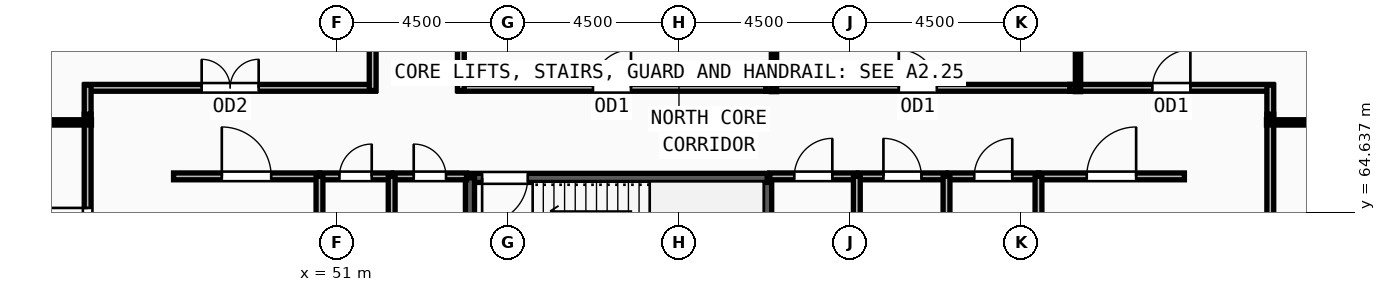
"""IFC4 building model, lengths in metres.
Left out: names, types, materials, properties, quantities, classifications, styles, units other than length and angle.
Written with IfcOpenShell. Run it as: python <this file> out.ifc"""

import sys

from ifc_helpers import new_model, si_unit, direction, frame, frame_2d, origin, place, context, subcontext, project, spatial, rectangle, extrude, source, transform, mapped, element, fill, save


model = new_model("IFC4")
c1 = context("Model", 3, precision=1e-05, world=origin(), true_north=direction((0.0, 1.0)))
c2 = subcontext(c1, "Body", "Model", "MODEL_VIEW")
j1 = project(units=[si_unit("LENGTHUNIT", "METRE"), si_unit("PLANEANGLEUNIT", "RADIAN")], contexts=[c1])
p1 = place(None, origin())
s1 = spatial("IfcSite", under=j1, at=p1, CompositionType="ELEMENT")
p2 = place(p1, origin())
s2 = spatial("IfcBuilding", under=s1, at=p2, CompositionType="ELEMENT")
p3 = place(p2, frame((0.0, 0.0, 328.5)))
s3 = spatial("IfcBuildingStorey", under=s2, at=p3, CompositionType="ELEMENT", Elevation=328.5)
p4 = place(p3, frame((62.32, 62.1, 0.0), z_axis=(0.0, 0.0, 1.0), x_axis=(0.0, 1.0, 0.0)))
e1 = element("IfcWall", 1, at=p4, inside=s3, PredefinedType="SOLIDWALL", context=c2, shape_type="SweptSolid", body=[
    extrude(rectangle(XDim=3.44, YDim=0.24, at=frame_2d((1.72, 0.0))), origin(), (0.0, 0.0, 1.0), 3.57),
])
p5 = place(p3, frame((62.32, 65.54, 0.0), z_axis=(0.0, 0.0, 1.0), x_axis=(-1.0, 0.0, 0.0)))
e2 = element("IfcWall", 2, at=p5, inside=s3, PredefinedType="SOLIDWALL", context=c2, shape_type="SweptSolid", body=[
    extrude(rectangle(XDim=7.82, YDim=0.24, at=frame_2d((3.91, 0.0))), origin(), (0.0, 0.0, 1.0), 3.57),
])
m1 = source(origin(), c2, "Body", "SweptSolid", [
    extrude(rectangle(XDim=1.2, YDim=2.2, at=frame_2d((0.6, 1.1))), frame((0.0, 0.13, 0.0), z_axis=(0.0, -1.0, 0.0), x_axis=(1.0, 0.0, 0.0)), (0.0, 0.0, 1.0), 0.26),
])
p6 = place(p5, frame((6.3, 0.0, 0.0)))
e3 = element("IfcOpeningElement", 3, at=p6, cuts=e2, PredefinedType="OPENING", context=c2, shape_type="MappedRepresentation", body=[
    mapped(m1, transform((0.0, 0.0, 0.0), x_axis=(1.0, 0.0, 0.0), y_axis=(0.0, 1.0, 0.0), z_axis=(0.0, 0.0, 1.0), scale=1.0)),
])
p7 = place(p3, frame((54.5, 65.54, 0.0), z_axis=(0.0, 0.0, 1.0), x_axis=(0.0, -1.0, 0.0)))
e4 = element("IfcWall", 4, at=p7, inside=s3, PredefinedType="SOLIDWALL", context=c2, shape_type="SweptSolid", body=[
    extrude(rectangle(XDim=3.44, YDim=0.24, at=frame_2d((1.72, 0.0))), origin(), (0.0, 0.0, 1.0), 3.57),
])
p8 = place(p3, frame((50.54, 65.58, 0.0), z_axis=(0.0, 0.0, 1.0), x_axis=(1.0, 0.0, 0.0)))
e5 = element("IfcWall", 5, at=p8, inside=s3, PredefinedType="PARTITIONING", context=c2, shape_type="SweptSolid", body=[
    extrude(rectangle(XDim=1.9, YDim=0.18, at=frame_2d((0.95, 0.0))), origin(), (0.0, 0.0, 1.0), 3.57),
])
m2 = source(origin(), c2, "Body", "SweptSolid", [
    extrude(rectangle(XDim=0.85, YDim=2.1, at=frame_2d((0.425, 1.05))), frame((0.0, 0.1, 0.0), z_axis=(0.0, -1.0, 0.0), x_axis=(1.0, 0.0, 0.0)), (0.0, 0.0, 1.0), 0.2),
])
p9 = place(p8, frame((0.525, 0.0, 0.0)))
e6 = element("IfcOpeningElement", 6, at=p9, cuts=e5, PredefinedType="OPENING", context=c2, shape_type="MappedRepresentation", body=[
    mapped(m2, transform((0.0, 0.0, 0.0), x_axis=(1.0, 0.0, 0.0), y_axis=(0.0, 1.0, 0.0), z_axis=(0.0, 0.0, 1.0), scale=1.0)),
])
p10 = place(p3, frame((52.48, 65.58, 0.0), z_axis=(0.0, 0.0, 1.0), x_axis=(1.0, 0.0, 0.0)))
e7 = element("IfcWall", 7, at=p10, inside=s3, PredefinedType="PARTITIONING", context=c2, shape_type="SweptSolid", body=[
    extrude(rectangle(XDim=1.93, YDim=0.18, at=frame_2d((0.965, 0.0))), origin(), (0.0, 0.0, 1.0), 3.57),
])
p11 = place(p10, frame((0.54, 0.0, 0.0)))
e8 = element("IfcOpeningElement", 8, at=p11, cuts=e7, PredefinedType="OPENING", context=c2, shape_type="MappedRepresentation", body=[
    mapped(m2, transform((0.0, 0.0, 0.0), x_axis=(1.0, 0.0, 0.0), y_axis=(0.0, 1.0, 0.0), z_axis=(0.0, 0.0, 1.0), scale=1.0)),
])
p12 = place(p3, frame((62.39, 65.58, 0.0), z_axis=(0.0, 0.0, 1.0), x_axis=(1.0, 0.0, 0.0)))
e9 = element("IfcWall", 9, at=p12, inside=s3, PredefinedType="PARTITIONING", context=c2, shape_type="SweptSolid", body=[
    extrude(rectangle(XDim=2.29, YDim=0.18, at=frame_2d((1.145, 0.0))), origin(), (0.0, 0.0, 1.0), 3.57),
])
m3 = source(origin(), c2, "Body", "SweptSolid", [
    extrude(rectangle(XDim=1.0, YDim=2.2, at=frame_2d((0.5, 1.1))), frame((0.0, 0.1, 0.0), z_axis=(0.0, -1.0, 0.0), x_axis=(1.0, 0.0, 0.0)), (0.0, 0.0, 1.0), 0.2),
])
p13 = place(p12, frame((0.645, 0.0, 0.0)))
e10 = element("IfcOpeningElement", 10, at=p13, cuts=e9, PredefinedType="OPENING", context=c2, shape_type="MappedRepresentation", body=[
    mapped(m3, transform((0.0, 0.0, 0.0), x_axis=(1.0, 0.0, 0.0), y_axis=(0.0, 1.0, 0.0), z_axis=(0.0, 0.0, 1.0), scale=1.0)),
])
p14 = place(p3, frame((64.72, 65.58, 0.0), z_axis=(0.0, 0.0, 1.0), x_axis=(1.0, 0.0, 0.0)))
e11 = element("IfcWall", 11, at=p14, inside=s3, PredefinedType="PARTITIONING", context=c2, shape_type="SweptSolid", body=[
    extrude(rectangle(XDim=2.32, YDim=0.18, at=frame_2d((1.16, 0.0))), origin(), (0.0, 0.0, 1.0), 3.57),
])
p15 = place(p14, frame((0.66, 0.0, 0.0)))
e12 = element("IfcOpeningElement", 12, at=p15, cuts=e11, PredefinedType="OPENING", context=c2, shape_type="MappedRepresentation", body=[
    mapped(m3, transform((0.0, 0.0, 0.0), x_axis=(1.0, 0.0, 0.0), y_axis=(0.0, 1.0, 0.0), z_axis=(0.0, 0.0, 1.0), scale=1.0)),
])
p16 = place(p3, frame((67.08, 65.58, 0.0), z_axis=(0.0, 0.0, 1.0), x_axis=(1.0, 0.0, 0.0)))
e13 = element("IfcWall", 13, at=p16, inside=s3, PredefinedType="PARTITIONING", context=c2, shape_type="SweptSolid", body=[
    extrude(rectangle(XDim=2.38, YDim=0.18, at=frame_2d((1.19, 0.0))), origin(), (0.0, 0.0, 1.0), 3.57),
])
p17 = place(p16, frame((0.69, 0.0, 0.0)))
e14 = element("IfcOpeningElement", 14, at=p17, cuts=e13, PredefinedType="OPENING", context=c2, shape_type="MappedRepresentation", body=[
    mapped(m3, transform((0.0, 0.0, 0.0), x_axis=(1.0, 0.0, 0.0), y_axis=(0.0, 1.0, 0.0), z_axis=(0.0, 0.0, 1.0), scale=1.0)),
])
p18 = place(p3, frame((46.7, 65.58, 0.0), z_axis=(0.0, 0.0, 1.0), x_axis=(1.0, 0.0, 0.0)))
e15 = element("IfcWall", 15, at=p18, inside=s3, PredefinedType="PARTITIONING", context=c2, shape_type="SweptSolid", body=[
    extrude(rectangle(XDim=3.84, YDim=0.18, at=frame_2d((1.92, 0.0))), origin(), (0.0, 0.0, 1.0), 3.57),
])
m4 = source(origin(), c2, "Body", "SweptSolid", [
    extrude(rectangle(XDim=1.3, YDim=2.2, at=frame_2d((0.65, 1.1))), frame((0.0, 0.1, 0.0), z_axis=(0.0, -1.0, 0.0), x_axis=(1.0, 0.0, 0.0)), (0.0, 0.0, 1.0), 0.2),
])
p19 = place(p18, frame((1.27, 0.0, 0.0)))
e16 = element("IfcOpeningElement", 16, at=p19, cuts=e15, PredefinedType="OPENING", context=c2, shape_type="MappedRepresentation", body=[
    mapped(m4, transform((0.0, 0.0, 0.0), x_axis=(1.0, 0.0, 0.0), y_axis=(0.0, 1.0, 0.0), z_axis=(0.0, 0.0, 1.0), scale=1.0)),
])
p20 = place(p3, frame((69.46, 65.58, 0.0), z_axis=(0.0, 0.0, 1.0), x_axis=(1.0, 0.0, 0.0)))
e17 = element("IfcWall", 17, at=p20, inside=s3, PredefinedType="PARTITIONING", context=c2, shape_type="SweptSolid", body=[
    extrude(rectangle(XDim=3.84, YDim=0.18, at=frame_2d((1.92, 0.0))), origin(), (0.0, 0.0, 1.0), 3.57),
])
p21 = place(p20, frame((1.27, 0.0, 0.0)))
e18 = element("IfcOpeningElement", 18, at=p21, cuts=e17, PredefinedType="OPENING", context=c2, shape_type="MappedRepresentation", body=[
    mapped(m4, transform((0.0, 0.0, 0.0), x_axis=(1.0, 0.0, 0.0), y_axis=(0.0, 1.0, 0.0), z_axis=(0.0, 0.0, 1.0), scale=1.0)),
])
p22 = place(p3, frame((75.56, 67.215, 0.0), z_axis=(0.0, 0.0, 1.0), x_axis=(0.0, -1.0, 0.0)))
e19 = element("IfcWall", 19, at=p22, inside=s3, PredefinedType="PARTITIONING", context=c2, shape_type="SweptSolid", body=[
    extrude(rectangle(XDim=16.825, YDim=0.18, at=frame_2d((8.413, 0.0))), origin(), (0.0, 0.0, 1.0), 3.57),
])
m5 = source(origin(), c2, "Body", "SweptSolid", [
    extrude(rectangle(XDim=1.5, YDim=2.2, at=frame_2d((0.75, 1.1))), frame((0.0, 0.1, 0.0), z_axis=(0.0, -1.0, 0.0), x_axis=(1.0, 0.0, 0.0)), (0.0, 0.0, 1.0), 0.2),
])
p23 = place(p22, frame((7.663, 0.0, 0.0)))
e20 = element("IfcOpeningElement", 20, at=p23, cuts=e19, PredefinedType="OPENING", context=c2, shape_type="MappedRepresentation", body=[
    mapped(m5, transform((0.0, 0.0, 0.0), x_axis=(1.0, 0.0, 0.0), y_axis=(0.0, 1.0, 0.0), z_axis=(0.0, 0.0, 1.0), scale=1.0)),
])
p24 = place(p3, frame((70.285, 67.91, 0.0), z_axis=(0.0, 0.0, 1.0), x_axis=(1.0, 0.0, 0.0)))
e21 = element("IfcWall", 21, at=p24, inside=s3, PredefinedType="PARTITIONING", context=c2, shape_type="SweptSolid", body=[
    extrude(rectangle(XDim=5.345, YDim=0.18, at=frame_2d((2.672, 0.0))), origin(), (0.0, 0.0, 1.0), 3.57),
])
p25 = place(p24, frame((2.172, 0.0, 0.0)))
e22 = element("IfcOpeningElement", 22, at=p25, cuts=e21, PredefinedType="OPENING", context=c2, shape_type="MappedRepresentation", body=[
    mapped(m3, transform((0.0, 0.0, 0.0), x_axis=(1.0, 0.0, 0.0), y_axis=(0.0, 1.0, 0.0), z_axis=(0.0, 0.0, 1.0), scale=1.0)),
])
p26 = place(p3, frame((62.285, 67.91, 0.0), z_axis=(0.0, 0.0, 1.0), x_axis=(1.0, 0.0, 0.0)))
e23 = element("IfcWall", 23, at=p26, inside=s3, PredefinedType="PARTITIONING", context=c2, shape_type="SweptSolid", body=[
    extrude(rectangle(XDim=8.0, YDim=0.18, at=frame_2d((4.0, 0.0))), origin(), (0.0, 0.0, 1.0), 3.57),
])
p27 = place(p26, frame((3.5, 0.0, 0.0)))
e24 = element("IfcOpeningElement", 24, at=p27, cuts=e23, PredefinedType="OPENING", context=c2, shape_type="MappedRepresentation", body=[
    mapped(m3, transform((0.0, 0.0, 0.0), x_axis=(1.0, 0.0, 0.0), y_axis=(0.0, 1.0, 0.0), z_axis=(0.0, 0.0, 1.0), scale=1.0)),
])
p28 = place(p3, frame((54.19, 67.91, 0.0), z_axis=(0.0, 0.0, 1.0), x_axis=(1.0, 0.0, 0.0)))
e25 = element("IfcWall", 25, at=p28, inside=s3, PredefinedType="PARTITIONING", context=c2, shape_type="SweptSolid", body=[
    extrude(rectangle(XDim=8.095, YDim=0.18, at=frame_2d((4.047, 0.0))), origin(), (0.0, 0.0, 1.0), 3.57),
])
p29 = place(p28, frame((3.547, 0.0, 0.0)))
e26 = element("IfcOpeningElement", 26, at=p29, cuts=e25, PredefinedType="OPENING", context=c2, shape_type="MappedRepresentation", body=[
    mapped(m3, transform((0.0, 0.0, 0.0), x_axis=(1.0, 0.0, 0.0), y_axis=(0.0, 1.0, 0.0), z_axis=(0.0, 0.0, 1.0), scale=1.0)),
])
p30 = place(p3, frame((44.37, 67.91, 0.0), z_axis=(0.0, 0.0, 1.0), x_axis=(1.0, 0.0, 0.0)))
e27 = element("IfcWall", 27, at=p30, inside=s3, PredefinedType="PARTITIONING", context=c2, shape_type="SweptSolid", body=[
    extrude(rectangle(XDim=7.64, YDim=0.18, at=frame_2d((3.82, 0.0))), origin(), (0.0, 0.0, 1.0), 3.57),
])
p31 = place(p30, frame((3.07, 0.0, 0.0)))
e28 = element("IfcOpeningElement", 28, at=p31, cuts=e27, PredefinedType="OPENING", context=c2, shape_type="MappedRepresentation", body=[
    mapped(m5, transform((0.0, 0.0, 0.0), x_axis=(1.0, 0.0, 0.0), y_axis=(0.0, 1.0, 0.0), z_axis=(0.0, 0.0, 1.0), scale=1.0)),
])
p32 = place(p3, frame((44.44, 61.285, 0.0), z_axis=(0.0, 0.0, 1.0), x_axis=(0.0, 1.0, 0.0)))
e29 = element("IfcWall", 29, at=p32, inside=s3, PredefinedType="PARTITIONING", context=c2, shape_type="SweptSolid", body=[
    extrude(rectangle(XDim=5.93, YDim=0.18, at=frame_2d((2.965, 0.0))), origin(), (0.0, 0.0, 1.0), 3.57),
])
p33 = place(p32, frame((2.465, 0.0, 0.0)))
e30 = element("IfcOpeningElement", 30, at=p33, cuts=e29, PredefinedType="OPENING", context=c2, shape_type="MappedRepresentation", body=[
    mapped(m3, transform((0.0, 0.0, 0.0), x_axis=(1.0, 0.0, 0.0), y_axis=(0.0, 1.0, 0.0), z_axis=(0.0, 0.0, 1.0), scale=1.0)),
])
p34 = place(p3, frame((50.54, 61.95, 0.0), z_axis=(0.0, 0.0, 1.0), x_axis=(0.0, 1.0, 0.0)))
e31 = element("IfcWall", 31, at=p34, inside=s3, PredefinedType="PARTITIONING", context=c2, shape_type="SweptSolid", body=[
    extrude(rectangle(XDim=3.63, YDim=0.18, at=frame_2d((1.815, 0.0))), origin(), (0.0, 0.0, 1.0), 3.57),
])
for number, where, z_axis, x_axis in (
    (32, (52.44, 61.775, 0.0), (0.0, 0.0, 1.0), (0.0, 1.0, 0.0)),
    (33, (64.68, 61.775, 0.0), (0.0, 0.0, 1.0), (0.0, 1.0, 0.0)),
    (34, (67.04, 61.775, 0.0), (0.0, 0.0, 1.0), (0.0, 1.0, 0.0)),
):
    element("IfcWall", number, at=place(p3, frame(where, z_axis=z_axis, x_axis=x_axis)), inside=s3, PredefinedType="PARTITIONING", context=c2, shape_type="SweptSolid", body=[
        extrude(rectangle(XDim=3.805, YDim=0.18, at=frame_2d((1.903, 0.0))), origin(), (0.0, 0.0, 1.0), 3.57),
    ])
p35 = place(p3, frame((69.46, 61.95, 0.0), z_axis=(0.0, 0.0, 1.0), x_axis=(0.0, 1.0, 0.0)))
e35 = element("IfcWall", 35, at=p35, inside=s3, PredefinedType="PARTITIONING", context=c2, shape_type="SweptSolid", body=[
    extrude(rectangle(XDim=3.63, YDim=0.18, at=frame_2d((1.815, 0.0))), origin(), (0.0, 0.0, 1.0), 3.57),
])
p36 = place(p3, frame((75.56, 67.98, 0.0), z_axis=(0.0, 0.0, 1.0), x_axis=(0.0, -1.0, 0.0)))
e36 = element("IfcWall", 36, at=p36, inside=s3, PredefinedType="PARTITIONING", context=c2, shape_type="SweptSolid", body=[
    extrude(rectangle(XDim=0.765, YDim=0.18, at=frame_2d((0.382, 0.0))), origin(), (0.0, 0.0, 1.0), 3.57),
])
p37 = place(p3, frame((54.26, 75.476, 0.0), z_axis=(0.0, 0.0, 1.0), x_axis=(0.0, -1.0, 0.0)))
e37 = element("IfcWall", 37, at=p37, inside=s3, PredefinedType="PARTITIONING", context=c2, shape_type="SweptSolid", body=[
    extrude(rectangle(XDim=7.636, YDim=0.18, at=frame_2d((3.818, 0.0))), origin(), (0.0, 0.0, 1.0), 3.57),
])
p38 = place(p3, frame((51.94, 67.84, 0.0), z_axis=(0.0, 0.0, 1.0), x_axis=(0.0, 1.0, 0.0)))
e38 = element("IfcWall", 38, at=p38, inside=s3, PredefinedType="PARTITIONING", context=c2, shape_type="SweptSolid", body=[
    extrude(rectangle(XDim=7.477, YDim=0.18, at=frame_2d((3.738, 0.0))), origin(), (0.0, 0.0, 1.0), 3.57),
])
p39 = place(p3, frame((44.44, 67.215, 0.0), z_axis=(0.0, 0.0, 1.0), x_axis=(0.0, 1.0, 0.0)))
e39 = element("IfcWall", 39, at=p39, inside=s3, PredefinedType="PARTITIONING", context=c2, shape_type="SweptSolid", body=[
    extrude(rectangle(XDim=0.765, YDim=0.18, at=frame_2d((0.382, 0.0))), origin(), (0.0, 0.0, 1.0), 3.57),
])
for number, where, z_axis, x_axis in (
    (40, (44.54, 67.0, 0.0), (0.0, 0.0, 1.0), (-1.0, 0.0, 0.0)),
    (41, (75.46, 67.0, 0.0), (0.0, 0.0, 1.0), (1.0, 0.0, 0.0)),
):
    element("IfcWall", number, at=place(p3, frame(where, z_axis=z_axis, x_axis=x_axis)), inside=s3, PredefinedType="PARTITIONING", context=c2, shape_type="SweptSolid", body=[
        extrude(rectangle(XDim=13.154, YDim=0.14, at=frame_2d((6.577, 0.0))), origin(), (0.0, 0.0, 1.0), 3.57),
    ])
p40 = place(p3, frame((62.5, 67.81, 0.0), z_axis=(0.0, 0.0, 1.0), x_axis=(0.0, 1.0, 0.0)))
e42 = element("IfcWall", 42, at=p40, inside=s3, PredefinedType="PARTITIONING", context=c2, shape_type="SweptSolid", body=[
    extrude(rectangle(XDim=8.287, YDim=0.14, at=frame_2d((4.144, 0.0))), origin(), (0.0, 0.0, 1.0), 3.57),
])
p41 = place(p3, frame((70.5, 67.81, 0.0), z_axis=(0.0, 0.0, 1.0), x_axis=(0.0, 1.0, 0.0)))
e43 = element("IfcWall", 43, at=p41, inside=s3, PredefinedType="PARTITIONING", context=c2, shape_type="SweptSolid", body=[
    extrude(rectangle(XDim=7.629, YDim=0.14, at=frame_2d((3.814, 0.0))), origin(), (0.0, 0.0, 1.0), 3.57),
])
m6 = source(origin(), c2, "Body", "SweptSolid", [
    extrude(rectangle(XDim=1.2, YDim=2.2, at=frame_2d((0.6, 1.1))), frame((0.0, 0.025, 0.0), z_axis=(0.0, -1.0, 0.0), x_axis=(1.0, 0.0, 0.0)), (0.0, 0.0, 1.0), 0.05),
])
p42 = place(p6, origin())
e44 = element("IfcDoor", 44, at=p42, inside=s3, OperationType="SINGLE_SWING_RIGHT", PredefinedType="DOOR", context=c2, shape_type="MappedRepresentation", body=[
    mapped(m6, transform((0.0, 0.0, 0.0), x_axis=(1.0, 0.0, 0.0), y_axis=(0.0, 1.0, 0.0), z_axis=(0.0, 0.0, 1.0), scale=1.0)),
])
fill(e3, e44)
m7 = source(origin(), c2, "Body", "SweptSolid", [
    extrude(rectangle(XDim=0.85, YDim=2.1, at=frame_2d((0.425, 1.05))), frame((0.0, 0.025, 0.0), z_axis=(0.0, -1.0, 0.0), x_axis=(1.0, 0.0, 0.0)), (0.0, 0.0, 1.0), 0.05),
])
p43 = place(p9, origin())
e45 = element("IfcDoor", 45, at=p43, inside=s3, OperationType="SINGLE_SWING_RIGHT", PredefinedType="DOOR", context=c2, shape_type="MappedRepresentation", body=[
    mapped(m7, transform((0.0, 0.0, 0.0), x_axis=(1.0, 0.0, 0.0), y_axis=(0.0, 1.0, 0.0), z_axis=(0.0, 0.0, 1.0), scale=1.0)),
])
fill(e6, e45)
p44 = place(p11, origin())
e46 = element("IfcDoor", 46, at=p44, inside=s3, OperationType="SINGLE_SWING_LEFT", PredefinedType="DOOR", context=c2, shape_type="MappedRepresentation", body=[
    mapped(m7, transform((0.0, 0.0, 0.0), x_axis=(1.0, 0.0, 0.0), y_axis=(0.0, 1.0, 0.0), z_axis=(0.0, 0.0, 1.0), scale=1.0)),
])
fill(e8, e46)
m8 = source(origin(), c2, "Body", "SweptSolid", [
    extrude(rectangle(XDim=1.0, YDim=2.2, at=frame_2d((0.5, 1.1))), frame((0.0, 0.025, 0.0), z_axis=(0.0, -1.0, 0.0), x_axis=(1.0, 0.0, 0.0)), (0.0, 0.0, 1.0), 0.05),
])
p45 = place(p13, origin())
e47 = element("IfcDoor", 47, at=p45, inside=s3, OperationType="SINGLE_SWING_RIGHT", PredefinedType="DOOR", context=c2, shape_type="MappedRepresentation", body=[
    mapped(m8, transform((0.0, 0.0, 0.0), x_axis=(1.0, 0.0, 0.0), y_axis=(0.0, 1.0, 0.0), z_axis=(0.0, 0.0, 1.0), scale=1.0)),
])
fill(e10, e47)
p46 = place(p15, origin())
e48 = element("IfcDoor", 48, at=p46, inside=s3, OperationType="SINGLE_SWING_LEFT", PredefinedType="DOOR", context=c2, shape_type="MappedRepresentation", body=[
    mapped(m8, transform((0.0, 0.0, 0.0), x_axis=(1.0, 0.0, 0.0), y_axis=(0.0, 1.0, 0.0), z_axis=(0.0, 0.0, 1.0), scale=1.0)),
])
fill(e12, e48)
p47 = place(p17, origin())
e49 = element("IfcDoor", 49, at=p47, inside=s3, OperationType="SINGLE_SWING_RIGHT", PredefinedType="DOOR", context=c2, shape_type="MappedRepresentation", body=[
    mapped(m8, transform((0.0, 0.0, 0.0), x_axis=(1.0, 0.0, 0.0), y_axis=(0.0, 1.0, 0.0), z_axis=(0.0, 0.0, 1.0), scale=1.0)),
])
fill(e14, e49)
m9 = source(origin(), c2, "Body", "SweptSolid", [
    extrude(rectangle(XDim=1.3, YDim=2.2, at=frame_2d((0.65, 1.1))), frame((0.0, 0.025, 0.0), z_axis=(0.0, -1.0, 0.0), x_axis=(1.0, 0.0, 0.0)), (0.0, 0.0, 1.0), 0.05),
])
p48 = place(p19, origin())
e50 = element("IfcDoor", 50, at=p48, inside=s3, OperationType="SINGLE_SWING_LEFT", PredefinedType="DOOR", context=c2, shape_type="MappedRepresentation", body=[
    mapped(m9, transform((0.0, 0.0, 0.0), x_axis=(1.0, 0.0, 0.0), y_axis=(0.0, 1.0, 0.0), z_axis=(0.0, 0.0, 1.0), scale=1.0)),
])
fill(e16, e50)
p49 = place(p21, origin())
e51 = element("IfcDoor", 51, at=p49, inside=s3, OperationType="SINGLE_SWING_RIGHT", PredefinedType="DOOR", context=c2, shape_type="MappedRepresentation", body=[
    mapped(m9, transform((0.0, 0.0, 0.0), x_axis=(1.0, 0.0, 0.0), y_axis=(0.0, 1.0, 0.0), z_axis=(0.0, 0.0, 1.0), scale=1.0)),
])
fill(e18, e51)
p50 = place(p25, origin())
e52 = element("IfcDoor", 52, at=p50, inside=s3, OperationType="SINGLE_SWING_RIGHT", PredefinedType="DOOR", context=c2, shape_type="MappedRepresentation", body=[
    mapped(m8, transform((0.0, 0.0, 0.0), x_axis=(1.0, 0.0, 0.0), y_axis=(0.0, 1.0, 0.0), z_axis=(0.0, 0.0, 1.0), scale=1.0)),
])
fill(e22, e52)
p51 = place(p27, origin())
e53 = element("IfcDoor", 53, at=p51, inside=s3, OperationType="SINGLE_SWING_LEFT", PredefinedType="DOOR", context=c2, shape_type="MappedRepresentation", body=[
    mapped(m8, transform((0.0, 0.0, 0.0), x_axis=(1.0, 0.0, 0.0), y_axis=(0.0, 1.0, 0.0), z_axis=(0.0, 0.0, 1.0), scale=1.0)),
])
fill(e24, e53)
p52 = place(p29, origin())
e54 = element("IfcDoor", 54, at=p52, inside=s3, OperationType="SINGLE_SWING_RIGHT", PredefinedType="DOOR", context=c2, shape_type="MappedRepresentation", body=[
    mapped(m8, transform((0.0, 0.0, 0.0), x_axis=(1.0, 0.0, 0.0), y_axis=(0.0, 1.0, 0.0), z_axis=(0.0, 0.0, 1.0), scale=1.0)),
])
fill(e26, e54)
m10 = source(origin(), c2, "Body", "SweptSolid", [
    extrude(rectangle(XDim=1.5, YDim=2.2, at=frame_2d((0.75, 1.1))), frame((0.0, 0.025, 0.0), z_axis=(0.0, -1.0, 0.0), x_axis=(1.0, 0.0, 0.0)), (0.0, 0.0, 1.0), 0.05),
])
p53 = place(p31, origin())
e55 = element("IfcDoor", 55, at=p53, inside=s3, OperationType="DOUBLE_DOOR_SINGLE_SWING", PredefinedType="DOOR", context=c2, shape_type="MappedRepresentation", body=[
    mapped(m10, transform((0.0, 0.0, 0.0), x_axis=(1.0, 0.0, 0.0), y_axis=(0.0, 1.0, 0.0), z_axis=(0.0, 0.0, 1.0), scale=1.0)),
])
fill(e28, e55)
p54 = place(p33, origin())
e56 = element("IfcDoor", 56, at=p54, inside=s3, OperationType="SINGLE_SWING_RIGHT", PredefinedType="DOOR", context=c2, shape_type="MappedRepresentation", body=[
    mapped(m8, transform((0.0, 0.0, 0.0), x_axis=(1.0, 0.0, 0.0), y_axis=(0.0, 1.0, 0.0), z_axis=(0.0, 0.0, 1.0), scale=1.0)),
])
fill(e30, e56)
save(model, sys.argv[1])
